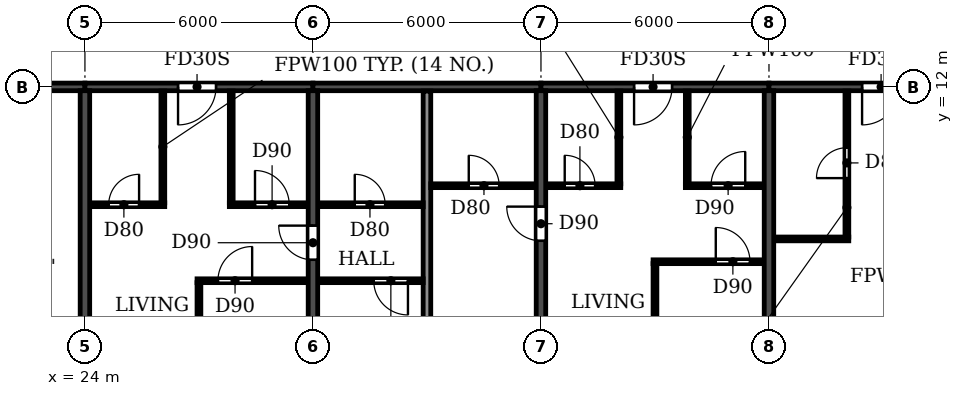
"""IFC4 building model, lengths in metres.
Left out: names, types, materials, properties, quantities, classifications, styles, units other than length and angle.
Written with IfcOpenShell. Run it as: python <this file> out.ifc"""

import sys

from ifc_helpers import new_model, si_unit, direction, frame, frame_2d, origin, place, context, subcontext, project, spatial, rectangle, extrude, element, fill, save


model = new_model("IFC4")
c1 = context("Model", 3, precision=1e-05, world=origin(), true_north=direction((0.0, 1.0)))
c2 = subcontext(c1, "Body", "Model", "MODEL_VIEW")
j1 = project(units=[si_unit("LENGTHUNIT", "METRE"), si_unit("PLANEANGLEUNIT", "RADIAN")], contexts=[c1])
p1 = place(None, origin())
s1 = spatial("IfcSite", under=j1, at=p1, CompositionType="ELEMENT")
p2 = place(p1, origin())
s2 = spatial("IfcBuilding", under=s1, at=p2, CompositionType="ELEMENT")
p3 = place(p2, frame((0.0, 0.0, 201.6)))
s3 = spatial("IfcBuildingStorey", under=s2, at=p3, CompositionType="ELEMENT", Elevation=201.6)
p4 = place(p3, frame((24.0, 0.2, 0.0), z_axis=(0.0, 0.0, 1.0), x_axis=(0.0, 1.0, 0.0)))
e1 = element("IfcWall", 1, at=p4, inside=s3, PredefinedType="SHEAR", context=c2, shape_type="SweptSolid", body=[
    extrude(rectangle(XDim=11.7, YDim=0.25, at=frame_2d((5.85, 0.0))), origin(), (0.0, 0.0, 1.0), 3.08),
])
p5 = place(p3, frame((30.0, 0.2, 0.0), z_axis=(0.0, 0.0, 1.0), x_axis=(0.0, 1.0, 0.0)))
e2 = element("IfcWall", 2, at=p5, inside=s3, PredefinedType="SHEAR", context=c2, shape_type="SweptSolid", body=[
    extrude(rectangle(XDim=11.7, YDim=0.25, at=frame_2d((5.85, 0.0))), origin(), (0.0, 0.0, 1.0), 3.08),
])
p6 = place(p5, frame((7.25, 0.0, 0.0)))
e3 = element("IfcOpeningElement", 3, at=p6, cuts=e2, PredefinedType="OPENING", context=c2, shape_type="SweptSolid", body=[
    extrude(rectangle(XDim=0.9, YDim=2.1, at=frame_2d((0.45, 1.05))), frame((0.0, 0.135, 0.0), z_axis=(0.0, -1.0, 0.0), x_axis=(1.0, 0.0, 0.0)), (0.0, 0.0, 1.0), 0.27),
])
p7 = place(p3, frame((36.0, 0.2, 0.0), z_axis=(0.0, 0.0, 1.0), x_axis=(0.0, 1.0, 0.0)))
e4 = element("IfcWall", 4, at=p7, inside=s3, PredefinedType="SHEAR", context=c2, shape_type="SweptSolid", body=[
    extrude(rectangle(XDim=11.7, YDim=0.25, at=frame_2d((5.85, 0.0))), origin(), (0.0, 0.0, 1.0), 3.08),
])
p8 = place(p7, frame((7.75, 0.0, 0.0)))
e5 = element("IfcOpeningElement", 5, at=p8, cuts=e4, PredefinedType="OPENING", context=c2, shape_type="SweptSolid", body=[
    extrude(rectangle(XDim=0.9, YDim=2.1, at=frame_2d((0.45, 1.05))), frame((0.0, 0.135, 0.0), z_axis=(0.0, -1.0, 0.0), x_axis=(1.0, 0.0, 0.0)), (0.0, 0.0, 1.0), 0.27),
])
p9 = place(p3, frame((42.0, 0.2, 0.0), z_axis=(0.0, 0.0, 1.0), x_axis=(0.0, 1.0, 0.0)))
e6 = element("IfcWall", 6, at=p9, inside=s3, PredefinedType="SHEAR", context=c2, shape_type="SweptSolid", body=[
    extrude(rectangle(XDim=11.7, YDim=0.25, at=frame_2d((5.85, 0.0))), origin(), (0.0, 0.0, 1.0), 3.08),
])
p10 = place(p3, frame((18.2, 12.0, 0.0), z_axis=(0.0, 0.0, 1.0), x_axis=(1.0, 0.0, 0.0)))
e7 = element("IfcWall", 7, at=p10, inside=s3, PredefinedType="SHEAR", context=c2, shape_type="SweptSolid", body=[
    extrude(rectangle(XDim=5.8, YDim=0.2, at=frame_2d((2.9, 0.0))), origin(), (0.0, 0.0, 1.0), 2.48),
])
p11 = place(p10, frame((2.3, 0.0, 0.0)))
e8 = element("IfcOpeningElement", 8, at=p11, cuts=e7, PredefinedType="OPENING", context=c2, shape_type="SweptSolid", body=[
    extrude(rectangle(XDim=1.0, YDim=2.1, at=frame_2d((0.5, 1.05))), frame((0.0, 0.11, 0.0), z_axis=(0.0, -1.0, 0.0), x_axis=(1.0, 0.0, 0.0)), (0.0, 0.0, 1.0), 0.22),
])
p12 = place(p3, frame((24.0, 12.0, 0.0), z_axis=(0.0, 0.0, 1.0), x_axis=(1.0, 0.0, 0.0)))
e9 = element("IfcWall", 9, at=p12, inside=s3, PredefinedType="SHEAR", context=c2, shape_type="SweptSolid", body=[
    extrude(rectangle(XDim=6.0, YDim=0.2, at=frame_2d((3.0, 0.0))), origin(), (0.0, 0.0, 1.0), 2.48),
])
p13 = place(p12, frame((2.45, 0.0, 0.0)))
e10 = element("IfcOpeningElement", 10, at=p13, cuts=e9, PredefinedType="OPENING", context=c2, shape_type="SweptSolid", body=[
    extrude(rectangle(XDim=1.0, YDim=2.1, at=frame_2d((0.5, 1.05))), frame((0.0, 0.11, 0.0), z_axis=(0.0, -1.0, 0.0), x_axis=(1.0, 0.0, 0.0)), (0.0, 0.0, 1.0), 0.22),
])
p14 = place(p3, frame((30.0, 12.0, 0.0), z_axis=(0.0, 0.0, 1.0), x_axis=(1.0, 0.0, 0.0)))
e11 = element("IfcWall", 11, at=p14, inside=s3, PredefinedType="SHEAR", context=c2, shape_type="SweptSolid", body=[
    extrude(rectangle(XDim=6.0, YDim=0.2, at=frame_2d((3.0, 0.0))), origin(), (0.0, 0.0, 1.0), 2.48),
])
p15 = place(p3, frame((36.0, 12.0, 0.0), z_axis=(0.0, 0.0, 1.0), x_axis=(1.0, 0.0, 0.0)))
e12 = element("IfcWall", 12, at=p15, inside=s3, PredefinedType="SHEAR", context=c2, shape_type="SweptSolid", body=[
    extrude(rectangle(XDim=6.0, YDim=0.2, at=frame_2d((3.0, 0.0))), origin(), (0.0, 0.0, 1.0), 2.48),
])
p16 = place(p15, frame((2.45, 0.0, 0.0)))
e13 = element("IfcOpeningElement", 13, at=p16, cuts=e12, PredefinedType="OPENING", context=c2, shape_type="SweptSolid", body=[
    extrude(rectangle(XDim=1.0, YDim=2.1, at=frame_2d((0.5, 1.05))), frame((0.0, 0.11, 0.0), z_axis=(0.0, -1.0, 0.0), x_axis=(1.0, 0.0, 0.0)), (0.0, 0.0, 1.0), 0.22),
])
p17 = place(p3, frame((42.0, 12.0, 0.0), z_axis=(0.0, 0.0, 1.0), x_axis=(1.0, 0.0, 0.0)))
e14 = element("IfcWall", 14, at=p17, inside=s3, PredefinedType="SHEAR", context=c2, shape_type="SweptSolid", body=[
    extrude(rectangle(XDim=6.0, YDim=0.2, at=frame_2d((3.0, 0.0))), origin(), (0.0, 0.0, 1.0), 2.48),
])
p18 = place(p17, frame((2.45, 0.0, 0.0)))
e15 = element("IfcOpeningElement", 15, at=p18, cuts=e14, PredefinedType="OPENING", context=c2, shape_type="SweptSolid", body=[
    extrude(rectangle(XDim=1.0, YDim=2.1, at=frame_2d((0.5, 1.05))), frame((0.0, 0.11, 0.0), z_axis=(0.0, -1.0, 0.0), x_axis=(1.0, 0.0, 0.0)), (0.0, 0.0, 1.0), 0.22),
])
p19 = place(p3, frame((33.0, 0.06, 0.0), z_axis=(0.0, 0.0, 1.0), x_axis=(0.0, 1.0, 0.0)))
e16 = element("IfcWall", 16, at=p19, inside=s3, PredefinedType="PARTITIONING", context=c2, shape_type="SweptSolid", body=[
    extrude(rectangle(XDim=11.83, YDim=0.2, at=frame_2d((5.915, 0.0))), origin(), (0.0, 0.0, 1.0), 3.08),
])
p20 = place(p3, frame((26.95, 6.9, 0.0), z_axis=(0.0, 0.0, 1.0), x_axis=(1.0, 0.0, 0.0)))
e17 = element("IfcWall", 17, at=p20, inside=s3, PredefinedType="PARTITIONING", context=c2, shape_type="SweptSolid", body=[
    extrude(rectangle(XDim=2.915, YDim=0.1, at=frame_2d((1.458, 0.0))), origin(), (0.0, 0.0, 1.0), 3.08),
])
p21 = place(p20, frame((0.55, 0.0, 0.0)))
e18 = element("IfcOpeningElement", 18, at=p21, cuts=e17, PredefinedType="OPENING", context=c2, shape_type="SweptSolid", body=[
    extrude(rectangle(XDim=0.9, YDim=2.1, at=frame_2d((0.45, 1.05))), frame((0.0, 0.06, 0.0), z_axis=(0.0, -1.0, 0.0), x_axis=(1.0, 0.0, 0.0)), (0.0, 0.0, 1.0), 0.12),
])
p22 = place(p3, frame((30.135, 6.9, 0.0), z_axis=(0.0, 0.0, 1.0), x_axis=(1.0, 0.0, 0.0)))
e19 = element("IfcWall", 19, at=p22, inside=s3, PredefinedType="PARTITIONING", context=c2, shape_type="SweptSolid", body=[
    extrude(rectangle(XDim=2.765, YDim=0.1, at=frame_2d((1.382, 0.0))), origin(), (0.0, 0.0, 1.0), 3.08),
])
p23 = place(p22, frame((1.465, 0.0, 0.0)))
e20 = element("IfcOpeningElement", 20, at=p23, cuts=e19, PredefinedType="OPENING", context=c2, shape_type="SweptSolid", body=[
    extrude(rectangle(XDim=0.9, YDim=2.1, at=frame_2d((0.45, 1.05))), frame((0.0, 0.06, 0.0), z_axis=(0.0, -1.0, 0.0), x_axis=(1.0, 0.0, 0.0)), (0.0, 0.0, 1.0), 0.12),
])
p24 = place(p3, frame((38.95, 7.4, 0.0), z_axis=(0.0, 0.0, 1.0), x_axis=(1.0, 0.0, 0.0)))
e21 = element("IfcWall", 21, at=p24, inside=s3, PredefinedType="PARTITIONING", context=c2, shape_type="SweptSolid", body=[
    extrude(rectangle(XDim=2.915, YDim=0.1, at=frame_2d((1.458, 0.0))), origin(), (0.0, 0.0, 1.0), 3.08),
])
p25 = place(p24, frame((1.65, 0.0, 0.0)))
e22 = element("IfcOpeningElement", 22, at=p25, cuts=e21, PredefinedType="OPENING", context=c2, shape_type="SweptSolid", body=[
    extrude(rectangle(XDim=0.9, YDim=2.1, at=frame_2d((0.45, 1.05))), frame((0.0, 0.06, 0.0), z_axis=(0.0, -1.0, 0.0), x_axis=(1.0, 0.0, 0.0)), (0.0, 0.0, 1.0), 0.12),
])
p26 = place(p3, frame((42.135, 8.0, 0.0), z_axis=(0.0, 0.0, 1.0), x_axis=(1.0, 0.0, 0.0)))
e23 = element("IfcWall", 23, at=p26, inside=s3, PredefinedType="PARTITIONING", context=c2, shape_type="SweptSolid", body=[
    extrude(rectangle(XDim=1.965, YDim=0.1, at=frame_2d((0.982, 0.0))), origin(), (0.0, 0.0, 1.0), 3.08),
])
p27 = place(p3, frame((24.135, 8.9, 0.0), z_axis=(0.0, 0.0, 1.0), x_axis=(1.0, 0.0, 0.0)))
e24 = element("IfcWall", 24, at=p27, inside=s3, PredefinedType="PARTITIONING", context=c2, shape_type="SweptSolid", body=[
    extrude(rectangle(XDim=1.965, YDim=0.1, at=frame_2d((0.982, 0.0))), origin(), (0.0, 0.0, 1.0), 3.08),
])
p28 = place(p27, frame((0.49, 0.0, 0.0)))
e25 = element("IfcOpeningElement", 25, at=p28, cuts=e24, PredefinedType="OPENING", context=c2, shape_type="SweptSolid", body=[
    extrude(rectangle(XDim=0.8, YDim=2.1, at=frame_2d((0.4, 1.05))), frame((0.0, 0.06, 0.0), z_axis=(0.0, -1.0, 0.0), x_axis=(1.0, 0.0, 0.0)), (0.0, 0.0, 1.0), 0.12),
])
p29 = place(p3, frame((27.8, 8.9, 0.0), z_axis=(0.0, 0.0, 1.0), x_axis=(1.0, 0.0, 0.0)))
e26 = element("IfcWall", 26, at=p29, inside=s3, PredefinedType="PARTITIONING", context=c2, shape_type="SweptSolid", body=[
    extrude(rectangle(XDim=2.065, YDim=0.1, at=frame_2d((1.032, 0.0))), origin(), (0.0, 0.0, 1.0), 3.08),
])
p30 = place(p29, frame((0.675, 0.0, 0.0)))
e27 = element("IfcOpeningElement", 27, at=p30, cuts=e26, PredefinedType="OPENING", context=c2, shape_type="SweptSolid", body=[
    extrude(rectangle(XDim=0.9, YDim=2.1, at=frame_2d((0.45, 1.05))), frame((0.0, 0.06, 0.0), z_axis=(0.0, -1.0, 0.0), x_axis=(1.0, 0.0, 0.0)), (0.0, 0.0, 1.0), 0.12),
])
p31 = place(p3, frame((30.135, 8.9, 0.0), z_axis=(0.0, 0.0, 1.0), x_axis=(1.0, 0.0, 0.0)))
e28 = element("IfcWall", 28, at=p31, inside=s3, PredefinedType="PARTITIONING", context=c2, shape_type="SweptSolid", body=[
    extrude(rectangle(XDim=2.765, YDim=0.1, at=frame_2d((1.382, 0.0))), origin(), (0.0, 0.0, 1.0), 3.08),
])
p32 = place(p31, frame((0.965, 0.0, 0.0)))
e29 = element("IfcOpeningElement", 29, at=p32, cuts=e28, PredefinedType="OPENING", context=c2, shape_type="SweptSolid", body=[
    extrude(rectangle(XDim=0.8, YDim=2.1, at=frame_2d((0.4, 1.05))), frame((0.0, 0.06, 0.0), z_axis=(0.0, -1.0, 0.0), x_axis=(1.0, 0.0, 0.0)), (0.0, 0.0, 1.0), 0.12),
])
p33 = place(p3, frame((33.1, 9.4, 0.0), z_axis=(0.0, 0.0, 1.0), x_axis=(1.0, 0.0, 0.0)))
e30 = element("IfcWall", 30, at=p33, inside=s3, PredefinedType="PARTITIONING", context=c2, shape_type="SweptSolid", body=[
    extrude(rectangle(XDim=2.765, YDim=0.1, at=frame_2d((1.382, 0.0))), origin(), (0.0, 0.0, 1.0), 3.08),
])
p34 = place(p33, frame((1.0, 0.0, 0.0)))
e31 = element("IfcOpeningElement", 31, at=p34, cuts=e30, PredefinedType="OPENING", context=c2, shape_type="SweptSolid", body=[
    extrude(rectangle(XDim=0.8, YDim=2.1, at=frame_2d((0.4, 1.05))), frame((0.0, 0.06, 0.0), z_axis=(0.0, -1.0, 0.0), x_axis=(1.0, 0.0, 0.0)), (0.0, 0.0, 1.0), 0.12),
])
p35 = place(p3, frame((36.135, 9.4, 0.0), z_axis=(0.0, 0.0, 1.0), x_axis=(1.0, 0.0, 0.0)))
e32 = element("IfcWall", 32, at=p35, inside=s3, PredefinedType="PARTITIONING", context=c2, shape_type="SweptSolid", body=[
    extrude(rectangle(XDim=1.965, YDim=0.1, at=frame_2d((0.982, 0.0))), origin(), (0.0, 0.0, 1.0), 3.08),
])
p36 = place(p35, frame((0.49, 0.0, 0.0)))
e33 = element("IfcOpeningElement", 33, at=p36, cuts=e32, PredefinedType="OPENING", context=c2, shape_type="SweptSolid", body=[
    extrude(rectangle(XDim=0.8, YDim=2.1, at=frame_2d((0.4, 1.05))), frame((0.0, 0.06, 0.0), z_axis=(0.0, -1.0, 0.0), x_axis=(1.0, 0.0, 0.0)), (0.0, 0.0, 1.0), 0.12),
])
p37 = place(p3, frame((39.8, 9.4, 0.0), z_axis=(0.0, 0.0, 1.0), x_axis=(1.0, 0.0, 0.0)))
e34 = element("IfcWall", 34, at=p37, inside=s3, PredefinedType="PARTITIONING", context=c2, shape_type="SweptSolid", body=[
    extrude(rectangle(XDim=2.065, YDim=0.1, at=frame_2d((1.032, 0.0))), origin(), (0.0, 0.0, 1.0), 3.08),
])
p38 = place(p37, frame((0.675, 0.0, 0.0)))
e35 = element("IfcOpeningElement", 35, at=p38, cuts=e34, PredefinedType="OPENING", context=c2, shape_type="SweptSolid", body=[
    extrude(rectangle(XDim=0.9, YDim=2.1, at=frame_2d((0.45, 1.05))), frame((0.0, 0.06, 0.0), z_axis=(0.0, -1.0, 0.0), x_axis=(1.0, 0.0, 0.0)), (0.0, 0.0, 1.0), 0.12),
])
p39 = place(p3, frame((26.05, 8.95, 0.0), z_axis=(0.0, 0.0, 1.0), x_axis=(0.0, 1.0, 0.0)))
e36 = element("IfcWall", 36, at=p39, inside=s3, PredefinedType="PARTITIONING", context=c2, shape_type="SweptSolid", body=[
    extrude(rectangle(XDim=2.94, YDim=0.1, at=frame_2d((1.47, 0.0))), origin(), (0.0, 0.0, 1.0), 3.08),
])
p40 = place(p3, frame((27.0, 0.06, 0.0), z_axis=(0.0, 0.0, 1.0), x_axis=(0.0, 1.0, 0.0)))
e37 = element("IfcWall", 37, at=p40, inside=s3, PredefinedType="PARTITIONING", context=c2, shape_type="SweptSolid", body=[
    extrude(rectangle(XDim=6.79, YDim=0.1, at=frame_2d((3.395, 0.0))), origin(), (0.0, 0.0, 1.0), 3.08),
])
p41 = place(p3, frame((27.85, 8.95, 0.0), z_axis=(0.0, 0.0, 1.0), x_axis=(0.0, 1.0, 0.0)))
e38 = element("IfcWall", 38, at=p41, inside=s3, PredefinedType="PARTITIONING", context=c2, shape_type="SweptSolid", body=[
    extrude(rectangle(XDim=2.94, YDim=0.1, at=frame_2d((1.47, 0.0))), origin(), (0.0, 0.0, 1.0), 3.08),
])
p42 = place(p3, frame((38.05, 9.45, 0.0), z_axis=(0.0, 0.0, 1.0), x_axis=(0.0, 1.0, 0.0)))
e39 = element("IfcWall", 39, at=p42, inside=s3, PredefinedType="PARTITIONING", context=c2, shape_type="SweptSolid", body=[
    extrude(rectangle(XDim=2.44, YDim=0.1, at=frame_2d((1.22, 0.0))), origin(), (0.0, 0.0, 1.0), 3.08),
])
p43 = place(p3, frame((39.0, 0.06, 0.0), z_axis=(0.0, 0.0, 1.0), x_axis=(0.0, 1.0, 0.0)))
e40 = element("IfcWall", 40, at=p43, inside=s3, PredefinedType="PARTITIONING", context=c2, shape_type="SweptSolid", body=[
    extrude(rectangle(XDim=7.29, YDim=0.1, at=frame_2d((3.645, 0.0))), origin(), (0.0, 0.0, 1.0), 3.08),
])
p44 = place(p3, frame((39.85, 9.45, 0.0), z_axis=(0.0, 0.0, 1.0), x_axis=(0.0, 1.0, 0.0)))
e41 = element("IfcWall", 41, at=p44, inside=s3, PredefinedType="PARTITIONING", context=c2, shape_type="SweptSolid", body=[
    extrude(rectangle(XDim=2.44, YDim=0.1, at=frame_2d((1.22, 0.0))), origin(), (0.0, 0.0, 1.0), 3.08),
])
p45 = place(p3, frame((44.05, 8.05, 0.0), z_axis=(0.0, 0.0, 1.0), x_axis=(0.0, 1.0, 0.0)))
e42 = element("IfcWall", 42, at=p45, inside=s3, PredefinedType="PARTITIONING", context=c2, shape_type="SweptSolid", body=[
    extrude(rectangle(XDim=3.84, YDim=0.1, at=frame_2d((1.92, 0.0))), origin(), (0.0, 0.0, 1.0), 3.08),
])
p46 = place(p45, frame((1.55, 0.0, 0.0)))
e43 = element("IfcOpeningElement", 43, at=p46, cuts=e42, PredefinedType="OPENING", context=c2, shape_type="SweptSolid", body=[
    extrude(rectangle(XDim=0.8, YDim=2.1, at=frame_2d((0.4, 1.05))), frame((0.0, 0.06, 0.0), z_axis=(0.0, -1.0, 0.0), x_axis=(1.0, 0.0, 0.0)), (0.0, 0.0, 1.0), 0.12),
])
p47 = place(p32, origin())
e44 = element("IfcDoor", 44, at=p47, inside=s3, OperationType="SINGLE_SWING_LEFT", PredefinedType="DOOR", context=c2, shape_type="SweptSolid", body=[
    extrude(rectangle(XDim=0.8, YDim=2.1, at=frame_2d((0.4, 1.05))), frame((0.0, 0.025, 0.0), z_axis=(0.0, -1.0, 0.0), x_axis=(1.0, 0.0, 0.0)), (0.0, 0.0, 1.0), 0.05),
])
fill(e29, e44)
p48 = place(p23, frame((0.9, 0.0, 0.0), z_axis=(0.0, 0.0, 1.0), x_axis=(-1.0, 0.0, 0.0)))
e45 = element("IfcDoor", 45, at=p48, inside=s3, OperationType="SINGLE_SWING_LEFT", PredefinedType="DOOR", context=c2, shape_type="SweptSolid", body=[
    extrude(rectangle(XDim=0.9, YDim=2.1, at=frame_2d((0.45, 1.05))), frame((0.0, 0.025, 0.0), z_axis=(0.0, -1.0, 0.0), x_axis=(1.0, 0.0, 0.0)), (0.0, 0.0, 1.0), 0.05),
])
fill(e20, e45)
p49 = place(p28, origin())
e46 = element("IfcDoor", 46, at=p49, inside=s3, OperationType="SINGLE_SWING_RIGHT", PredefinedType="DOOR", context=c2, shape_type="SweptSolid", body=[
    extrude(rectangle(XDim=0.8, YDim=2.1, at=frame_2d((0.4, 1.05))), frame((0.0, 0.025, 0.0), z_axis=(0.0, -1.0, 0.0), x_axis=(1.0, 0.0, 0.0)), (0.0, 0.0, 1.0), 0.05),
])
fill(e25, e46)
p50 = place(p13, frame((1.0, 0.0, 0.0), z_axis=(0.0, 0.0, 1.0), x_axis=(-1.0, 0.0, 0.0)))
e47 = element("IfcDoor", 47, at=p50, inside=s3, OperationType="SINGLE_SWING_RIGHT", PredefinedType="DOOR", context=c2, shape_type="SweptSolid", body=[
    extrude(rectangle(XDim=1.0, YDim=2.1, at=frame_2d((0.5, 1.05))), frame((0.0, 0.025, 0.0), z_axis=(0.0, -1.0, 0.0), x_axis=(1.0, 0.0, 0.0)), (0.0, 0.0, 1.0), 0.05),
])
fill(e10, e47)
p51 = place(p21, origin())
e48 = element("IfcDoor", 48, at=p51, inside=s3, OperationType="SINGLE_SWING_RIGHT", PredefinedType="DOOR", context=c2, shape_type="SweptSolid", body=[
    extrude(rectangle(XDim=0.9, YDim=2.1, at=frame_2d((0.45, 1.05))), frame((0.0, 0.025, 0.0), z_axis=(0.0, -1.0, 0.0), x_axis=(1.0, 0.0, 0.0)), (0.0, 0.0, 1.0), 0.05),
])
fill(e18, e48)
p52 = place(p30, origin())
e49 = element("IfcDoor", 49, at=p52, inside=s3, OperationType="SINGLE_SWING_LEFT", PredefinedType="DOOR", context=c2, shape_type="SweptSolid", body=[
    extrude(rectangle(XDim=0.9, YDim=2.1, at=frame_2d((0.45, 1.05))), frame((0.0, 0.025, 0.0), z_axis=(0.0, -1.0, 0.0), x_axis=(1.0, 0.0, 0.0)), (0.0, 0.0, 1.0), 0.05),
])
fill(e27, e49)
p53 = place(p6, origin())
e50 = element("IfcDoor", 50, at=p53, inside=s3, OperationType="SINGLE_SWING_RIGHT", PredefinedType="DOOR", context=c2, shape_type="SweptSolid", body=[
    extrude(rectangle(XDim=0.9, YDim=2.1, at=frame_2d((0.45, 1.05))), frame((0.0, 0.025, 0.0), z_axis=(0.0, -1.0, 0.0), x_axis=(1.0, 0.0, 0.0)), (0.0, 0.0, 1.0), 0.05),
])
fill(e3, e50)
p54 = place(p34, origin())
e51 = element("IfcDoor", 51, at=p54, inside=s3, OperationType="SINGLE_SWING_LEFT", PredefinedType="DOOR", context=c2, shape_type="SweptSolid", body=[
    extrude(rectangle(XDim=0.8, YDim=2.1, at=frame_2d((0.4, 1.05))), frame((0.0, 0.025, 0.0), z_axis=(0.0, -1.0, 0.0), x_axis=(1.0, 0.0, 0.0)), (0.0, 0.0, 1.0), 0.05),
])
fill(e31, e51)
p55 = place(p8, origin())
e52 = element("IfcDoor", 52, at=p55, inside=s3, OperationType="SINGLE_SWING_RIGHT", PredefinedType="DOOR", context=c2, shape_type="SweptSolid", body=[
    extrude(rectangle(XDim=0.9, YDim=2.1, at=frame_2d((0.45, 1.05))), frame((0.0, 0.025, 0.0), z_axis=(0.0, -1.0, 0.0), x_axis=(1.0, 0.0, 0.0)), (0.0, 0.0, 1.0), 0.05),
])
fill(e5, e52)
p56 = place(p36, origin())
e53 = element("IfcDoor", 53, at=p56, inside=s3, OperationType="SINGLE_SWING_LEFT", PredefinedType="DOOR", context=c2, shape_type="SweptSolid", body=[
    extrude(rectangle(XDim=0.8, YDim=2.1, at=frame_2d((0.4, 1.05))), frame((0.0, 0.025, 0.0), z_axis=(0.0, -1.0, 0.0), x_axis=(1.0, 0.0, 0.0)), (0.0, 0.0, 1.0), 0.05),
])
fill(e33, e53)
p57 = place(p16, frame((1.0, 0.0, 0.0), z_axis=(0.0, 0.0, 1.0), x_axis=(-1.0, 0.0, 0.0)))
e54 = element("IfcDoor", 54, at=p57, inside=s3, OperationType="SINGLE_SWING_RIGHT", PredefinedType="DOOR", context=c2, shape_type="SweptSolid", body=[
    extrude(rectangle(XDim=1.0, YDim=2.1, at=frame_2d((0.5, 1.05))), frame((0.0, 0.025, 0.0), z_axis=(0.0, -1.0, 0.0), x_axis=(1.0, 0.0, 0.0)), (0.0, 0.0, 1.0), 0.05),
])
fill(e13, e54)
p58 = place(p38, origin())
e55 = element("IfcDoor", 55, at=p58, inside=s3, OperationType="SINGLE_SWING_RIGHT", PredefinedType="DOOR", context=c2, shape_type="SweptSolid", body=[
    extrude(rectangle(XDim=0.9, YDim=2.1, at=frame_2d((0.45, 1.05))), frame((0.0, 0.025, 0.0), z_axis=(0.0, -1.0, 0.0), x_axis=(1.0, 0.0, 0.0)), (0.0, 0.0, 1.0), 0.05),
])
fill(e35, e55)
p59 = place(p25, origin())
e56 = element("IfcDoor", 56, at=p59, inside=s3, OperationType="SINGLE_SWING_LEFT", PredefinedType="DOOR", context=c2, shape_type="SweptSolid", body=[
    extrude(rectangle(XDim=0.9, YDim=2.1, at=frame_2d((0.45, 1.05))), frame((0.0, 0.025, 0.0), z_axis=(0.0, -1.0, 0.0), x_axis=(1.0, 0.0, 0.0)), (0.0, 0.0, 1.0), 0.05),
])
fill(e22, e56)
p60 = place(p46, origin())
e57 = element("IfcDoor", 57, at=p60, inside=s3, OperationType="SINGLE_SWING_LEFT", PredefinedType="DOOR", context=c2, shape_type="SweptSolid", body=[
    extrude(rectangle(XDim=0.8, YDim=2.1, at=frame_2d((0.4, 1.05))), frame((0.0, 0.025, 0.0), z_axis=(0.0, -1.0, 0.0), x_axis=(1.0, 0.0, 0.0)), (0.0, 0.0, 1.0), 0.05),
])
fill(e43, e57)
p61 = place(p18, frame((1.0, 0.0, 0.0), z_axis=(0.0, 0.0, 1.0), x_axis=(-1.0, 0.0, 0.0)))
e58 = element("IfcDoor", 58, at=p61, inside=s3, OperationType="SINGLE_SWING_RIGHT", PredefinedType="DOOR", context=c2, shape_type="SweptSolid", body=[
    extrude(rectangle(XDim=1.0, YDim=2.1, at=frame_2d((0.5, 1.05))), frame((0.0, 0.025, 0.0), z_axis=(0.0, -1.0, 0.0), x_axis=(1.0, 0.0, 0.0)), (0.0, 0.0, 1.0), 0.05),
])
fill(e15, e58)
save(model, sys.argv[1])
